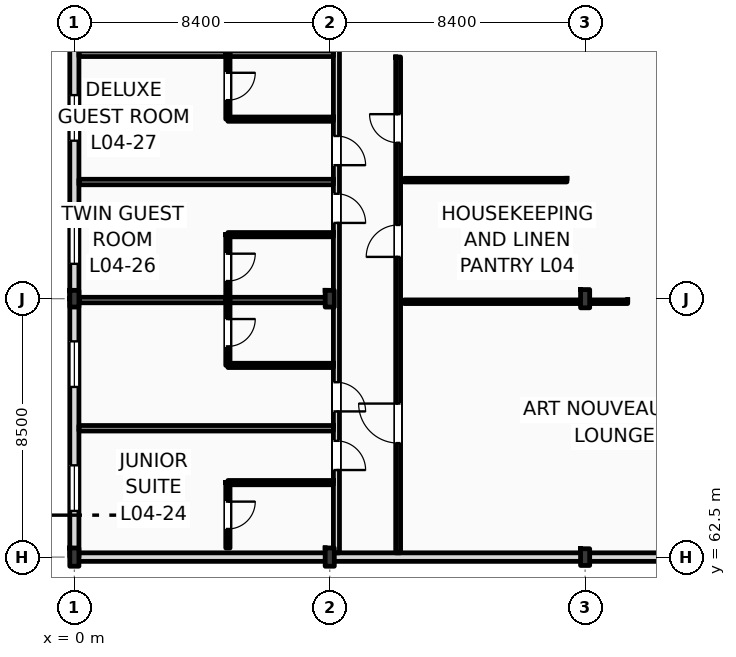
"""IFC4 building model, lengths in metres.
Left out: names, types, materials, properties, quantities, classifications, styles, units other than length and angle.
Written with IfcOpenShell. Run it as: python <this file> out.ifc"""

import sys

from ifc_helpers import new_model, si_unit, direction, frame, frame_2d, origin, origin_2d, place, context, subcontext, project, spatial, rectangle, i_section, extrude, element, fill, save


model = new_model("IFC4")
c1 = context("Model", 3, precision=1e-05, world=origin(), true_north=direction((0.0, 1.0)))
c2 = subcontext(c1, "Body", "Model", "MODEL_VIEW")
j1 = project(units=[si_unit("LENGTHUNIT", "METRE"), si_unit("PLANEANGLEUNIT", "RADIAN")], contexts=[c1])
p1 = place(None, origin())
s1 = spatial("IfcSite", under=j1, at=p1, CompositionType="ELEMENT")
p2 = place(p1, origin())
s2 = spatial("IfcBuilding", under=s1, at=p2, CompositionType="ELEMENT")
p3 = place(p2, frame((0.0, 0.0, 20.4)))
s3 = spatial("IfcBuildingStorey", under=s2, at=p3, CompositionType="ELEMENT", Elevation=20.4)
p4 = place(p3, frame((0.0, 62.5, 0.0), z_axis=(0.0, 0.0, 1.0), x_axis=(1.0, 0.0, 0.0)))
e1 = element("IfcColumn", 1, at=p4, inside=s3, PredefinedType="COLUMN", context=c2, shape_type="SweptSolid", body=[
    extrude(i_section(OverallWidth=0.3, OverallDepth=0.6, WebThickness=0.015, FlangeThickness=0.03, FilletRadius=0.027, at=origin_2d()), origin(), (0.0, 0.0, 1.0), 4.2),
])
p5 = place(p3, frame((0.0, 71.0, 0.0), z_axis=(0.0, 0.0, 1.0), x_axis=(1.0, 0.0, 0.0)))
e2 = element("IfcColumn", 2, at=p5, inside=s3, PredefinedType="COLUMN", context=c2, shape_type="SweptSolid", body=[
    extrude(i_section(OverallWidth=0.3, OverallDepth=0.55, WebThickness=0.015, FlangeThickness=0.029, FilletRadius=0.027, at=origin_2d()), origin(), (0.0, 0.0, 1.0), 4.2),
])
p6 = place(p3, frame((8.4, 62.5, 0.0), z_axis=(0.0, 0.0, 1.0), x_axis=(1.0, 0.0, 0.0)))
e3 = element("IfcColumn", 3, at=p6, inside=s3, PredefinedType="COLUMN", context=c2, shape_type="SweptSolid", body=[
    extrude(i_section(OverallWidth=0.3, OverallDepth=0.6, WebThickness=0.015, FlangeThickness=0.03, FilletRadius=0.027, at=origin_2d()), origin(), (0.0, 0.0, 1.0), 4.2),
])
for number, where, z_axis, x_axis in (
    (4, (8.4, 71.0, 0.0), (0.0, 0.0, 1.0), (1.0, 0.0, 0.0)),
    (5, (16.8, 62.5, 0.0), (0.0, 0.0, 1.0), (1.0, 0.0, 0.0)),
):
    element("IfcColumn", number, at=place(p3, frame(where, z_axis=z_axis, x_axis=x_axis)), inside=s3, PredefinedType="COLUMN", context=c2, shape_type="SweptSolid", body=[
        extrude(i_section(OverallWidth=0.3, OverallDepth=0.55, WebThickness=0.015, FlangeThickness=0.029, FilletRadius=0.027, at=origin_2d()), origin(), (0.0, 0.0, 1.0), 4.2),
    ])
p7 = place(p3, frame((16.8, 71.0, 0.0), z_axis=(0.0, 0.0, 1.0), x_axis=(1.0, 0.0, 0.0)))
e6 = element("IfcColumn", 6, at=p7, inside=s3, PredefinedType="COLUMN", context=c2, shape_type="SweptSolid", body=[
    extrude(i_section(OverallWidth=0.3, OverallDepth=0.6, WebThickness=0.015, FlangeThickness=0.03, FilletRadius=0.027, at=origin_2d()), origin(), (0.0, 0.0, 1.0), 4.2),
])
p8 = place(p3, frame((0.0, 62.5, 0.0), z_axis=(0.0, 0.0, 1.0), x_axis=(0.0, 1.0, 0.0)))
e7 = element("IfcWall", 7, at=p8, inside=s3, PredefinedType="STANDARD", context=c2, shape_type="SweptSolid", body=[
    extrude(rectangle(XDim=8.5, YDim=0.3, at=frame_2d((4.25, 0.0))), origin(), (0.0, 0.0, 1.0), 3.53),
])
p9 = place(p8, frame((1.519, 0.0, 0.9)))
e8 = element("IfcOpeningElement", 8, at=p9, cuts=e7, PredefinedType="OPENING", context=c2, shape_type="SweptSolid", body=[
    extrude(rectangle(XDim=1.5, YDim=1.75, at=frame_2d((0.75, 0.875))), frame((0.0, 0.16, 0.0), z_axis=(0.0, -1.0, 0.0), x_axis=(1.0, 0.0, 0.0)), (0.0, 0.0, 1.0), 0.32),
])
p10 = place(p8, frame((5.597, 0.0, 0.9)))
e9 = element("IfcOpeningElement", 9, at=p10, cuts=e7, PredefinedType="OPENING", context=c2, shape_type="SweptSolid", body=[
    extrude(rectangle(XDim=1.5, YDim=2.3, at=frame_2d((0.75, 1.15))), frame((0.0, 0.16, 0.0), z_axis=(0.0, -1.0, 0.0), x_axis=(1.0, 0.0, 0.0)), (0.0, 0.0, 1.0), 0.32),
])
p11 = place(p3, frame((0.0, 71.0, 0.0), z_axis=(0.0, 0.0, 1.0), x_axis=(0.0, 1.0, 0.0)))
e10 = element("IfcWall", 10, at=p11, inside=s3, PredefinedType="STANDARD", context=c2, shape_type="SweptSolid", body=[
    extrude(rectangle(XDim=8.5, YDim=0.3, at=frame_2d((4.25, 0.0))), origin(), (0.0, 0.0, 1.0), 3.53),
])
p12 = place(p11, frame((1.147, 0.0, 0.9)))
e11 = element("IfcOpeningElement", 11, at=p12, cuts=e10, PredefinedType="OPENING", context=c2, shape_type="SweptSolid", body=[
    extrude(rectangle(XDim=1.5, YDim=2.45, at=frame_2d((0.75, 1.225))), frame((0.0, 0.16, 0.0), z_axis=(0.0, -1.0, 0.0), x_axis=(1.0, 0.0, 0.0)), (0.0, 0.0, 1.0), 0.32),
])
p13 = place(p11, frame((5.197, 0.0, 0.9)))
e12 = element("IfcOpeningElement", 12, at=p13, cuts=e10, PredefinedType="OPENING", context=c2, shape_type="SweptSolid", body=[
    extrude(rectangle(XDim=1.5, YDim=2.45, at=frame_2d((0.75, 1.225))), frame((0.0, 0.16, 0.0), z_axis=(0.0, -1.0, 0.0), x_axis=(1.0, 0.0, 0.0)), (0.0, 0.0, 1.0), 0.32),
])
p14 = place(p3, frame((0.0, 62.5, 0.0), z_axis=(0.0, 0.0, 1.0), x_axis=(1.0, 0.0, 0.0)))
e13 = element("IfcWall", 13, at=p14, inside=s3, PredefinedType="STANDARD", context=c2, shape_type="SweptSolid", body=[
    extrude(rectangle(XDim=25.2, YDim=0.28, at=frame_2d((12.6, 0.0))), origin(), (0.0, 0.0, 1.0), 3.38),
])
p15 = place(p3, frame((8.62, 62.64, 0.0), z_axis=(0.0, 0.0, 1.0), x_axis=(0.0, 1.0, 0.0)))
e14 = element("IfcWall", 14, at=p15, inside=s3, PredefinedType="PARTITIONING", context=c2, shape_type="SweptSolid", body=[
    extrude(rectangle(XDim=32.66, YDim=0.2, at=frame_2d((16.33, 0.0))), origin(), (0.0, 0.0, 1.0), 3.53),
])
p16 = place(p15, frame((2.724, 0.0, 0.0)))
e15 = element("IfcOpeningElement", 15, at=p16, cuts=e14, PredefinedType="OPENING", context=c2, shape_type="SweptSolid", body=[
    extrude(rectangle(XDim=0.96, YDim=2.2, at=frame_2d((0.48, 1.1))), frame((0.0, 0.11, 0.0), z_axis=(0.0, -1.0, 0.0), x_axis=(1.0, 0.0, 0.0)), (0.0, 0.0, 1.0), 0.22),
])
p17 = place(p15, frame((4.652, 0.0, 0.0)))
e16 = element("IfcOpeningElement", 16, at=p17, cuts=e14, PredefinedType="OPENING", context=c2, shape_type="SweptSolid", body=[
    extrude(rectangle(XDim=0.96, YDim=2.2, at=frame_2d((0.48, 1.1))), frame((0.0, 0.11, 0.0), z_axis=(0.0, -1.0, 0.0), x_axis=(1.0, 0.0, 0.0)), (0.0, 0.0, 1.0), 0.22),
])
p18 = place(p15, frame((10.852, 0.0, 0.0)))
e17 = element("IfcOpeningElement", 17, at=p18, cuts=e14, PredefinedType="OPENING", context=c2, shape_type="SweptSolid", body=[
    extrude(rectangle(XDim=0.96, YDim=2.2, at=frame_2d((0.48, 1.1))), frame((0.0, 0.11, 0.0), z_axis=(0.0, -1.0, 0.0), x_axis=(1.0, 0.0, 0.0)), (0.0, 0.0, 1.0), 0.22),
])
p19 = place(p15, frame((12.752, 0.0, 0.0)))
e18 = element("IfcOpeningElement", 18, at=p19, cuts=e14, PredefinedType="OPENING", context=c2, shape_type="SweptSolid", body=[
    extrude(rectangle(XDim=0.96, YDim=2.2, at=frame_2d((0.48, 1.1))), frame((0.0, 0.11, 0.0), z_axis=(0.0, -1.0, 0.0), x_axis=(1.0, 0.0, 0.0)), (0.0, 0.0, 1.0), 0.22),
])
p20 = place(p15, frame((18.952, 0.0, 0.0)))
e19 = element("IfcOpeningElement", 19, at=p20, cuts=e14, PredefinedType="OPENING", context=c2, shape_type="SweptSolid", body=[
    extrude(rectangle(XDim=0.96, YDim=2.2, at=frame_2d((0.48, 1.1))), frame((0.0, 0.11, 0.0), z_axis=(0.0, -1.0, 0.0), x_axis=(1.0, 0.0, 0.0)), (0.0, 0.0, 1.0), 0.22),
])
p21 = place(p15, frame((23.002, 0.0, 0.0)))
e20 = element("IfcOpeningElement", 20, at=p21, cuts=e14, PredefinedType="OPENING", context=c2, shape_type="SweptSolid", body=[
    extrude(rectangle(XDim=0.96, YDim=2.2, at=frame_2d((0.48, 1.1))), frame((0.0, 0.11, 0.0), z_axis=(0.0, -1.0, 0.0), x_axis=(1.0, 0.0, 0.0)), (0.0, 0.0, 1.0), 0.22),
])
p22 = place(p15, frame((27.052, 0.0, 0.0)))
e21 = element("IfcOpeningElement", 21, at=p22, cuts=e14, PredefinedType="OPENING", context=c2, shape_type="SweptSolid", body=[
    extrude(rectangle(XDim=0.96, YDim=2.2, at=frame_2d((0.48, 1.1))), frame((0.0, 0.11, 0.0), z_axis=(0.0, -1.0, 0.0), x_axis=(1.0, 0.0, 0.0)), (0.0, 0.0, 1.0), 0.22),
])
p23 = place(p15, frame((31.074, 0.0, 0.0)))
e22 = element("IfcOpeningElement", 22, at=p23, cuts=e14, PredefinedType="OPENING", context=c2, shape_type="SweptSolid", body=[
    extrude(rectangle(XDim=0.96, YDim=2.2, at=frame_2d((0.48, 1.1))), frame((0.0, 0.11, 0.0), z_axis=(0.0, -1.0, 0.0), x_axis=(1.0, 0.0, 0.0)), (0.0, 0.0, 1.0), 0.22),
])
p24 = place(p3, frame((10.65, 62.64, 0.0), z_axis=(0.0, 0.0, 1.0), x_axis=(0.0, 1.0, 0.0)))
e23 = element("IfcWall", 23, at=p24, inside=s3, PredefinedType="PARTITIONING", context=c2, shape_type="SweptSolid", body=[
    extrude(rectangle(XDim=16.31, YDim=0.16, at=frame_2d((8.155, 0.0))), origin(), (0.0, 0.0, 1.0), 3.94),
])
p25 = place(p24, frame((3.61, 0.0, 0.0)))
e24 = element("IfcOpeningElement", 24, at=p25, cuts=e23, PredefinedType="OPENING", context=c2, shape_type="SweptSolid", body=[
    extrude(rectangle(XDim=1.3, YDim=2.2, at=frame_2d((0.65, 1.1))), frame((0.0, 0.09, 0.0), z_axis=(0.0, -1.0, 0.0), x_axis=(1.0, 0.0, 0.0)), (0.0, 0.0, 1.0), 0.18),
])
p26 = place(p24, frame((9.735, 0.0, 0.0)))
e25 = element("IfcOpeningElement", 25, at=p26, cuts=e23, PredefinedType="OPENING", context=c2, shape_type="SweptSolid", body=[
    extrude(rectangle(XDim=1.05, YDim=2.12, at=frame_2d((0.525, 1.06))), frame((0.0, 0.09, 0.0), z_axis=(0.0, -1.0, 0.0), x_axis=(1.0, 0.0, 0.0)), (0.0, 0.0, 1.0), 0.18),
])
p27 = place(p24, frame((13.49, 0.0, 0.0)))
e26 = element("IfcOpeningElement", 26, at=p27, cuts=e23, PredefinedType="OPENING", context=c2, shape_type="SweptSolid", body=[
    extrude(rectangle(XDim=0.94, YDim=2.15, at=frame_2d((0.47, 1.075))), frame((0.0, 0.09, 0.0), z_axis=(0.0, -1.0, 0.0), x_axis=(1.0, 0.0, 0.0)), (0.0, 0.0, 1.0), 0.18),
])
p28 = place(p3, frame((0.15, 66.738, 0.0), z_axis=(0.0, 0.0, 1.0), x_axis=(1.0, 0.0, 0.0)))
e27 = element("IfcWall", 27, at=p28, inside=s3, PredefinedType="PARTITIONING", context=c2, shape_type="SweptSolid", body=[
    extrude(rectangle(XDim=8.37, YDim=0.18, at=frame_2d((4.185, 0.0))), origin(), (0.0, 0.0, 1.0), 3.94),
])
p29 = place(p3, frame((5.05, 64.95, 0.0), z_axis=(0.0, 0.0, 1.0), x_axis=(1.0, 0.0, 0.0)))
e28 = element("IfcWall", 28, at=p29, inside=s3, PredefinedType="PARTITIONING", context=c2, shape_type="SweptSolid", body=[
    extrude(rectangle(XDim=3.47, YDim=0.14, at=frame_2d((1.735, 0.0))), origin(), (0.0, 0.0, 1.0), 3.94),
])
p30 = place(p3, frame((5.05, 62.8, 0.0), z_axis=(0.0, 0.0, 1.0), x_axis=(0.0, 1.0, 0.0)))
e29 = element("IfcWall", 29, at=p30, inside=s3, PredefinedType="PARTITIONING", context=c2, shape_type="SweptSolid", body=[
    extrude(rectangle(XDim=2.15, YDim=0.14, at=frame_2d((1.075, 0.0))), origin(), (0.0, 0.0, 1.0), 3.94),
])
p31 = place(p30, frame((0.625, 0.0, 0.0)))
e30 = element("IfcOpeningElement", 30, at=p31, cuts=e29, PredefinedType="OPENING", context=c2, shape_type="SweptSolid", body=[
    extrude(rectangle(XDim=0.9, YDim=2.1, at=frame_2d((0.45, 1.05))), frame((0.0, 0.08, 0.0), z_axis=(0.0, -1.0, 0.0), x_axis=(1.0, 0.0, 0.0)), (0.0, 0.0, 1.0), 0.16),
])
p32 = place(p3, frame((0.15, 70.956, 0.0), z_axis=(0.0, 0.0, 1.0), x_axis=(1.0, 0.0, 0.0)))
e31 = element("IfcWall", 31, at=p32, inside=s3, PredefinedType="PARTITIONING", context=c2, shape_type="SweptSolid", body=[
    extrude(rectangle(XDim=8.37, YDim=0.18, at=frame_2d((4.185, 0.0))), origin(), (0.0, 0.0, 1.0), 3.38),
])
p33 = place(p3, frame((5.05, 68.806, 0.0), z_axis=(0.0, 0.0, 1.0), x_axis=(1.0, 0.0, 0.0)))
e32 = element("IfcWall", 32, at=p33, inside=s3, PredefinedType="PARTITIONING", context=c2, shape_type="SweptSolid", body=[
    extrude(rectangle(XDim=3.47, YDim=0.14, at=frame_2d((1.735, 0.0))), origin(), (0.0, 0.0, 1.0), 3.94),
])
p34 = place(p3, frame((5.05, 68.806, 0.0), z_axis=(0.0, 0.0, 1.0), x_axis=(0.0, 1.0, 0.0)))
e33 = element("IfcWall", 33, at=p34, inside=s3, PredefinedType="PARTITIONING", context=c2, shape_type="SweptSolid", body=[
    extrude(rectangle(XDim=2.15, YDim=0.14, at=frame_2d((1.075, 0.0))), origin(), (0.0, 0.0, 1.0), 3.94),
])
p35 = place(p34, frame((0.625, 0.0, 0.0)))
e34 = element("IfcOpeningElement", 34, at=p35, cuts=e33, PredefinedType="OPENING", context=c2, shape_type="SweptSolid", body=[
    extrude(rectangle(XDim=0.9, YDim=2.1, at=frame_2d((0.45, 1.05))), frame((0.0, 0.08, 0.0), z_axis=(0.0, -1.0, 0.0), x_axis=(1.0, 0.0, 0.0)), (0.0, 0.0, 1.0), 0.16),
])
p36 = place(p3, frame((0.15, 74.838, 0.0), z_axis=(0.0, 0.0, 1.0), x_axis=(1.0, 0.0, 0.0)))
e35 = element("IfcWall", 35, at=p36, inside=s3, PredefinedType="PARTITIONING", context=c2, shape_type="SweptSolid", body=[
    extrude(rectangle(XDim=8.37, YDim=0.18, at=frame_2d((4.185, 0.0))), origin(), (0.0, 0.0, 1.0), 3.94),
])
p37 = place(p3, frame((5.05, 73.106, 0.0), z_axis=(0.0, 0.0, 1.0), x_axis=(1.0, 0.0, 0.0)))
e36 = element("IfcWall", 36, at=p37, inside=s3, PredefinedType="PARTITIONING", context=c2, shape_type="SweptSolid", body=[
    extrude(rectangle(XDim=3.47, YDim=0.14, at=frame_2d((1.735, 0.0))), origin(), (0.0, 0.0, 1.0), 3.94),
])
p38 = place(p3, frame((5.05, 70.956, 0.0), z_axis=(0.0, 0.0, 1.0), x_axis=(0.0, 1.0, 0.0)))
e37 = element("IfcWall", 37, at=p38, inside=s3, PredefinedType="PARTITIONING", context=c2, shape_type="SweptSolid", body=[
    extrude(rectangle(XDim=2.15, YDim=0.14, at=frame_2d((1.075, 0.0))), origin(), (0.0, 0.0, 1.0), 3.94),
])
p39 = place(p38, frame((0.625, 0.0, 0.0)))
e38 = element("IfcOpeningElement", 38, at=p39, cuts=e37, PredefinedType="OPENING", context=c2, shape_type="SweptSolid", body=[
    extrude(rectangle(XDim=0.9, YDim=2.1, at=frame_2d((0.45, 1.05))), frame((0.0, 0.08, 0.0), z_axis=(0.0, -1.0, 0.0), x_axis=(1.0, 0.0, 0.0)), (0.0, 0.0, 1.0), 0.16),
])
p40 = place(p3, frame((0.15, 79.056, 0.0), z_axis=(0.0, 0.0, 1.0), x_axis=(1.0, 0.0, 0.0)))
e39 = element("IfcWall", 39, at=p40, inside=s3, PredefinedType="PARTITIONING", context=c2, shape_type="SweptSolid", body=[
    extrude(rectangle(XDim=8.37, YDim=0.18, at=frame_2d((4.185, 0.0))), origin(), (0.0, 0.0, 1.0), 3.94),
])
p41 = place(p3, frame((5.05, 76.906, 0.0), z_axis=(0.0, 0.0, 1.0), x_axis=(1.0, 0.0, 0.0)))
e40 = element("IfcWall", 40, at=p41, inside=s3, PredefinedType="PARTITIONING", context=c2, shape_type="SweptSolid", body=[
    extrude(rectangle(XDim=3.47, YDim=0.14, at=frame_2d((1.735, 0.0))), origin(), (0.0, 0.0, 1.0), 3.94),
])
p42 = place(p3, frame((5.05, 76.906, 0.0), z_axis=(0.0, 0.0, 1.0), x_axis=(0.0, 1.0, 0.0)))
e41 = element("IfcWall", 41, at=p42, inside=s3, PredefinedType="PARTITIONING", context=c2, shape_type="SweptSolid", body=[
    extrude(rectangle(XDim=2.15, YDim=0.14, at=frame_2d((1.075, 0.0))), origin(), (0.0, 0.0, 1.0), 3.94),
])
p43 = place(p42, frame((0.625, 0.0, 0.0)))
e42 = element("IfcOpeningElement", 42, at=p43, cuts=e41, PredefinedType="OPENING", context=c2, shape_type="SweptSolid", body=[
    extrude(rectangle(XDim=0.9, YDim=2.1, at=frame_2d((0.45, 1.05))), frame((0.0, 0.08, 0.0), z_axis=(0.0, -1.0, 0.0), x_axis=(1.0, 0.0, 0.0)), (0.0, 0.0, 1.0), 0.16),
])
p44 = place(p3, frame((5.05, 79.056, 0.0), z_axis=(0.0, 0.0, 1.0), x_axis=(0.0, 1.0, 0.0)))
e43 = element("IfcWall", 43, at=p44, inside=s3, PredefinedType="PARTITIONING", context=c2, shape_type="SweptSolid", body=[
    extrude(rectangle(XDim=2.15, YDim=0.14, at=frame_2d((1.075, 0.0))), origin(), (0.0, 0.0, 1.0), 3.94),
])
p45 = place(p44, frame((0.625, 0.0, 0.0)))
e44 = element("IfcOpeningElement", 44, at=p45, cuts=e43, PredefinedType="OPENING", context=c2, shape_type="SweptSolid", body=[
    extrude(rectangle(XDim=0.9, YDim=2.1, at=frame_2d((0.45, 1.05))), frame((0.0, 0.08, 0.0), z_axis=(0.0, -1.0, 0.0), x_axis=(1.0, 0.0, 0.0)), (0.0, 0.0, 1.0), 0.16),
])
p46 = place(p3, frame((10.85, 70.9, 0.0), z_axis=(0.0, 0.0, 1.0), x_axis=(1.0, 0.0, 0.0)))
e45 = element("IfcWall", 45, at=p46, inside=s3, PredefinedType="PARTITIONING", context=c2, shape_type="SweptSolid", body=[
    extrude(rectangle(XDim=7.35, YDim=0.12, at=frame_2d((3.675, 0.0))), origin(), (0.0, 0.0, 1.0), 3.38),
])
p47 = place(p3, frame((10.85, 74.9, 0.0), z_axis=(0.0, 0.0, 1.0), x_axis=(1.0, 0.0, 0.0)))
e46 = element("IfcWall", 46, at=p47, inside=s3, PredefinedType="PARTITIONING", context=c2, shape_type="SweptSolid", body=[
    extrude(rectangle(XDim=5.35, YDim=0.12, at=frame_2d((2.675, 0.0))), origin(), (0.0, 0.0, 1.0), 3.94),
])
p48 = place(p9, origin())
e47 = element("IfcWindow", 47, at=p48, inside=s3, PartitioningType="DOUBLE_PANEL_VERTICAL", PredefinedType="WINDOW", context=c2, shape_type="SweptSolid", body=[
    extrude(rectangle(XDim=1.5, YDim=1.75, at=frame_2d((0.75, 0.875))), frame((0.0, 0.03, 0.0), z_axis=(0.0, -1.0, 0.0), x_axis=(1.0, 0.0, 0.0)), (0.0, 0.0, 1.0), 0.06),
])
fill(e8, e47)
p49 = place(p10, origin())
e48 = element("IfcWindow", 48, at=p49, inside=s3, PartitioningType="DOUBLE_PANEL_VERTICAL", PredefinedType="WINDOW", context=c2, shape_type="SweptSolid", body=[
    extrude(rectangle(XDim=1.5, YDim=2.3, at=frame_2d((0.75, 1.15))), frame((0.0, 0.03, 0.0), z_axis=(0.0, -1.0, 0.0), x_axis=(1.0, 0.0, 0.0)), (0.0, 0.0, 1.0), 0.06),
])
fill(e9, e48)
p50 = place(p12, origin())
e49 = element("IfcWindow", 49, at=p50, inside=s3, PartitioningType="DOUBLE_PANEL_VERTICAL", PredefinedType="WINDOW", context=c2, shape_type="SweptSolid", body=[
    extrude(rectangle(XDim=1.5, YDim=2.45, at=frame_2d((0.75, 1.225))), frame((0.0, 0.03, 0.0), z_axis=(0.0, -1.0, 0.0), x_axis=(1.0, 0.0, 0.0)), (0.0, 0.0, 1.0), 0.06),
])
fill(e11, e49)
p51 = place(p13, origin())
e50 = element("IfcWindow", 50, at=p51, inside=s3, PartitioningType="DOUBLE_PANEL_VERTICAL", PredefinedType="WINDOW", context=c2, shape_type="SweptSolid", body=[
    extrude(rectangle(XDim=1.5, YDim=2.45, at=frame_2d((0.75, 1.225))), frame((0.0, 0.03, 0.0), z_axis=(0.0, -1.0, 0.0), x_axis=(1.0, 0.0, 0.0)), (0.0, 0.0, 1.0), 0.06),
])
fill(e12, e50)
p52 = place(p16, frame((0.96, 0.0, 0.0), z_axis=(0.0, 0.0, 1.0), x_axis=(-1.0, 0.0, 0.0)))
e51 = element("IfcDoor", 51, at=p52, inside=s3, OperationType="SINGLE_SWING_LEFT", PredefinedType="DOOR", context=c2, shape_type="SweptSolid", body=[
    extrude(rectangle(XDim=0.96, YDim=2.2, at=frame_2d((0.48, 1.1))), frame((0.0, 0.025, 0.0), z_axis=(0.0, -1.0, 0.0), x_axis=(1.0, 0.0, 0.0)), (0.0, 0.0, 1.0), 0.05),
])
fill(e15, e51)
p53 = place(p31, frame((0.9, 0.0, 0.0), z_axis=(0.0, 0.0, 1.0), x_axis=(-1.0, 0.0, 0.0)))
e52 = element("IfcDoor", 52, at=p53, inside=s3, OperationType="SINGLE_SWING_RIGHT", PredefinedType="DOOR", context=c2, shape_type="SweptSolid", body=[
    extrude(rectangle(XDim=0.9, YDim=2.1, at=frame_2d((0.45, 1.05))), frame((0.0, 0.025, 0.0), z_axis=(0.0, -1.0, 0.0), x_axis=(1.0, 0.0, 0.0)), (0.0, 0.0, 1.0), 0.05),
])
fill(e30, e52)
p54 = place(p17, frame((0.96, 0.0, 0.0), z_axis=(0.0, 0.0, 1.0), x_axis=(-1.0, 0.0, 0.0)))
e53 = element("IfcDoor", 53, at=p54, inside=s3, OperationType="SINGLE_SWING_LEFT", PredefinedType="DOOR", context=c2, shape_type="SweptSolid", body=[
    extrude(rectangle(XDim=0.96, YDim=2.2, at=frame_2d((0.48, 1.1))), frame((0.0, 0.025, 0.0), z_axis=(0.0, -1.0, 0.0), x_axis=(1.0, 0.0, 0.0)), (0.0, 0.0, 1.0), 0.05),
])
fill(e16, e53)
p55 = place(p35, frame((0.9, 0.0, 0.0), z_axis=(0.0, 0.0, 1.0), x_axis=(-1.0, 0.0, 0.0)))
e54 = element("IfcDoor", 54, at=p55, inside=s3, OperationType="SINGLE_SWING_RIGHT", PredefinedType="DOOR", context=c2, shape_type="SweptSolid", body=[
    extrude(rectangle(XDim=0.9, YDim=2.1, at=frame_2d((0.45, 1.05))), frame((0.0, 0.025, 0.0), z_axis=(0.0, -1.0, 0.0), x_axis=(1.0, 0.0, 0.0)), (0.0, 0.0, 1.0), 0.05),
])
fill(e34, e54)
p56 = place(p18, frame((0.96, 0.0, 0.0), z_axis=(0.0, 0.0, 1.0), x_axis=(-1.0, 0.0, 0.0)))
e55 = element("IfcDoor", 55, at=p56, inside=s3, OperationType="SINGLE_SWING_LEFT", PredefinedType="DOOR", context=c2, shape_type="SweptSolid", body=[
    extrude(rectangle(XDim=0.96, YDim=2.2, at=frame_2d((0.48, 1.1))), frame((0.0, 0.025, 0.0), z_axis=(0.0, -1.0, 0.0), x_axis=(1.0, 0.0, 0.0)), (0.0, 0.0, 1.0), 0.05),
])
fill(e17, e55)
p57 = place(p39, frame((0.9, 0.0, 0.0), z_axis=(0.0, 0.0, 1.0), x_axis=(-1.0, 0.0, 0.0)))
e56 = element("IfcDoor", 56, at=p57, inside=s3, OperationType="SINGLE_SWING_RIGHT", PredefinedType="DOOR", context=c2, shape_type="SweptSolid", body=[
    extrude(rectangle(XDim=0.9, YDim=2.1, at=frame_2d((0.45, 1.05))), frame((0.0, 0.025, 0.0), z_axis=(0.0, -1.0, 0.0), x_axis=(1.0, 0.0, 0.0)), (0.0, 0.0, 1.0), 0.05),
])
fill(e38, e56)
p58 = place(p19, frame((0.96, 0.0, 0.0), z_axis=(0.0, 0.0, 1.0), x_axis=(-1.0, 0.0, 0.0)))
e57 = element("IfcDoor", 57, at=p58, inside=s3, OperationType="SINGLE_SWING_LEFT", PredefinedType="DOOR", context=c2, shape_type="SweptSolid", body=[
    extrude(rectangle(XDim=0.96, YDim=2.2, at=frame_2d((0.48, 1.1))), frame((0.0, 0.025, 0.0), z_axis=(0.0, -1.0, 0.0), x_axis=(1.0, 0.0, 0.0)), (0.0, 0.0, 1.0), 0.05),
])
fill(e18, e57)
p59 = place(p43, frame((0.9, 0.0, 0.0), z_axis=(0.0, 0.0, 1.0), x_axis=(-1.0, 0.0, 0.0)))
e58 = element("IfcDoor", 58, at=p59, inside=s3, OperationType="SINGLE_SWING_RIGHT", PredefinedType="DOOR", context=c2, shape_type="SweptSolid", body=[
    extrude(rectangle(XDim=0.9, YDim=2.1, at=frame_2d((0.45, 1.05))), frame((0.0, 0.025, 0.0), z_axis=(0.0, -1.0, 0.0), x_axis=(1.0, 0.0, 0.0)), (0.0, 0.0, 1.0), 0.05),
])
fill(e42, e58)
p60 = place(p25, origin())
e59 = element("IfcDoor", 59, at=p60, inside=s3, OperationType="SINGLE_SWING_RIGHT", PredefinedType="DOOR", context=c2, shape_type="SweptSolid", body=[
    extrude(rectangle(XDim=1.3, YDim=2.2, at=frame_2d((0.65, 1.1))), frame((0.0, 0.025, 0.0), z_axis=(0.0, -1.0, 0.0), x_axis=(1.0, 0.0, 0.0)), (0.0, 0.0, 1.0), 0.05),
])
fill(e24, e59)
p61 = place(p26, origin())
e60 = element("IfcDoor", 60, at=p61, inside=s3, OperationType="SINGLE_SWING_LEFT", PredefinedType="DOOR", context=c2, shape_type="SweptSolid", body=[
    extrude(rectangle(XDim=1.05, YDim=2.12, at=frame_2d((0.525, 1.06))), frame((0.0, 0.025, 0.0), z_axis=(0.0, -1.0, 0.0), x_axis=(1.0, 0.0, 0.0)), (0.0, 0.0, 1.0), 0.05),
])
fill(e25, e60)
p62 = place(p27, origin())
e61 = element("IfcDoor", 61, at=p62, inside=s3, OperationType="SINGLE_SWING_RIGHT", PredefinedType="DOOR", context=c2, shape_type="SweptSolid", body=[
    extrude(rectangle(XDim=0.94, YDim=2.15, at=frame_2d((0.47, 1.075))), frame((0.0, 0.025, 0.0), z_axis=(0.0, -1.0, 0.0), x_axis=(1.0, 0.0, 0.0)), (0.0, 0.0, 1.0), 0.05),
])
fill(e26, e61)
save(model, sys.argv[1])
